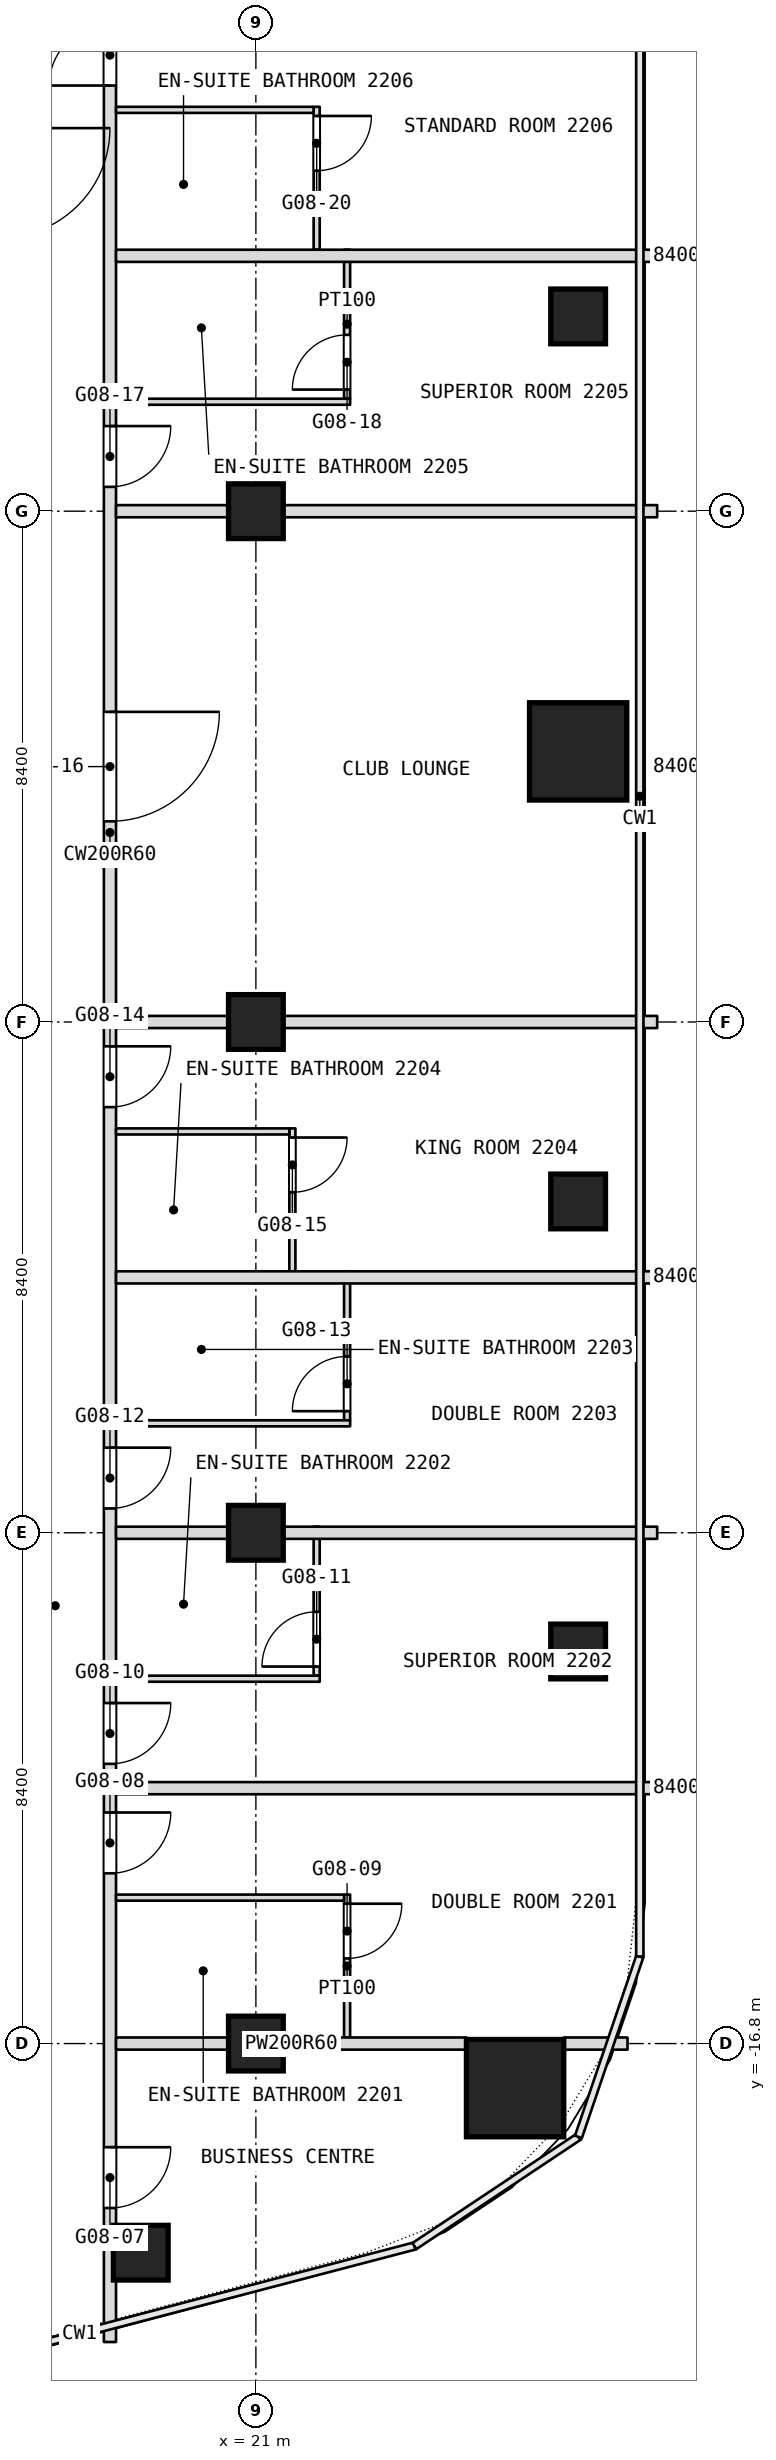
"""IFC4 building model, lengths in metres.
Left out: names, types, materials, properties, quantities, classifications, styles, units other than length and angle.
Written with IfcOpenShell. Run it as: python <this file> out.ifc"""

import sys

from ifc_helpers import new_model, si_unit, direction, frame, frame_2d, origin, origin_2d, place, context, subcontext, project, spatial, rectangle, extrude, element, fill, save


model = new_model("IFC4")
c1 = context("Model", 3, precision=1e-05, world=origin(), true_north=direction((0.0, 1.0)))
c2 = subcontext(c1, "Body", "Model", "MODEL_VIEW")
j1 = project(units=[si_unit("LENGTHUNIT", "METRE"), si_unit("PLANEANGLEUNIT", "RADIAN")], contexts=[c1])
p1 = place(None, origin())
s1 = spatial("IfcSite", under=j1, at=p1, CompositionType="ELEMENT")
p2 = place(p1, origin())
s2 = spatial("IfcBuilding", under=s1, at=p2, CompositionType="ELEMENT")
p3 = place(p2, frame((0.0, 0.0, 104.9)))
s3 = spatial("IfcBuildingStorey", under=s2, at=p3, CompositionType="ELEMENT", Elevation=104.9)
for number, where, z_axis, x_axis in (
    (1, (25.263, -17.533, 0.0), (0.0, 0.0, 1.0), (1.0, 0.0, 0.0)),
    (2, (26.3, 4.45, 0.0), (0.0, 0.0, 1.0), (1.0, 0.0, 0.0)),
):
    element("IfcColumn", number, at=place(p3, frame(where, z_axis=z_axis, x_axis=x_axis)), inside=s3, PredefinedType="COLUMN", context=c2, shape_type="SweptSolid", body=[
        extrude(rectangle(XDim=1.6, YDim=1.6, at=origin_2d()), origin(), (0.0, 0.0, 1.0), 3.6),
    ])
for number, where, z_axis, x_axis in (
    (3, (21.0, -16.8, 0.0), (0.0, 0.0, 1.0), (1.0, 0.0, 0.0)),
    (4, (21.0, -8.4, 0.0), (0.0, 0.0, 1.0), (1.0, 0.0, 0.0)),
    (5, (21.0, 0.0, 0.0), (0.0, 0.0, 1.0), (1.0, 0.0, 0.0)),
    (6, (21.0, 8.4, 0.0), (0.0, 0.0, 1.0), (1.0, 0.0, 0.0)),
    (7, (26.3, 11.603, 0.0), (0.0, 0.0, 1.0), (1.0, 0.0, 0.0)),
    (8, (26.3, -2.951, 0.0), (0.0, 0.0, 1.0), (1.0, 0.0, 0.0)),
    (9, (26.3, -10.352, 0.0), (0.0, 0.0, 1.0), (1.0, 0.0, 0.0)),
    (10, (19.107, -20.239, 0.0), (0.0, 0.0, 1.0), (1.0, 0.0, 0.0)),
):
    element("IfcColumn", number, at=place(p3, frame(where, z_axis=z_axis, x_axis=x_axis)), inside=s3, PredefinedType="COLUMN", context=c2, shape_type="SweptSolid", body=[
        extrude(rectangle(XDim=0.9, YDim=0.9, at=origin_2d()), origin(), (0.0, 0.0, 1.0), 3.6),
    ])
p4 = place(p3, frame((22.5, -16.7, 0.0), z_axis=(0.0, 0.0, 1.0), x_axis=(0.0, 1.0, 0.0)))
e11 = element("IfcWall", 11, at=p4, inside=s3, PredefinedType="PARTITIONING", context=c2, shape_type="SweptSolid", body=[
    extrude(rectangle(XDim=2.35, YDim=0.1, at=frame_2d((1.175, 0.0))), origin(), (0.0, 0.0, 1.0), 3.34),
])
p5 = place(p4, frame((1.3, 0.0, 0.0)))
e12 = element("IfcOpeningElement", 12, at=p5, cuts=e11, PredefinedType="OPENING", context=c2, shape_type="SweptSolid", body=[
    extrude(rectangle(XDim=0.9, YDim=2.1, at=frame_2d((0.45, 1.05))), frame((0.0, 0.05, 0.0), z_axis=(0.0, -1.0, 0.0), x_axis=(1.0, 0.0, 0.0)), (0.0, 0.0, 1.0), 0.1),
])
p6 = place(p3, frame((22.5, -6.55, 0.0), z_axis=(0.0, 0.0, 1.0), x_axis=(0.0, 1.0, 0.0)))
e13 = element("IfcWall", 13, at=p6, inside=s3, PredefinedType="PARTITIONING", context=c2, shape_type="SweptSolid", body=[
    extrude(rectangle(XDim=2.45, YDim=0.1, at=frame_2d((1.225, 0.0))), origin(), (0.0, 0.0, 1.0), 3.34),
])
p7 = place(p6, frame((0.15, 0.0, 0.0)))
e14 = element("IfcOpeningElement", 14, at=p7, cuts=e13, PredefinedType="OPENING", context=c2, shape_type="SweptSolid", body=[
    extrude(rectangle(XDim=0.9, YDim=2.1, at=frame_2d((0.45, 1.05))), frame((0.0, 0.05, 0.0), z_axis=(0.0, -1.0, 0.0), x_axis=(1.0, 0.0, 0.0)), (0.0, 0.0, 1.0), 0.1),
])
p8 = place(p3, frame((22.5, 10.25, 0.0), z_axis=(0.0, 0.0, 1.0), x_axis=(0.0, 1.0, 0.0)))
e15 = element("IfcWall", 15, at=p8, inside=s3, PredefinedType="PARTITIONING", context=c2, shape_type="SweptSolid", body=[
    extrude(rectangle(XDim=2.45, YDim=0.1, at=frame_2d((1.225, 0.0))), origin(), (0.0, 0.0, 1.0), 3.34),
])
p9 = place(p8, frame((0.15, 0.0, 0.0)))
e16 = element("IfcOpeningElement", 16, at=p9, cuts=e15, PredefinedType="OPENING", context=c2, shape_type="SweptSolid", body=[
    extrude(rectangle(XDim=0.9, YDim=2.1, at=frame_2d((0.45, 1.05))), frame((0.0, 0.05, 0.0), z_axis=(0.0, -1.0, 0.0), x_axis=(1.0, 0.0, 0.0)), (0.0, 0.0, 1.0), 0.1),
])
p10 = place(p3, frame((22.0, -10.75, 0.0), z_axis=(0.0, 0.0, 1.0), x_axis=(0.0, 1.0, 0.0)))
e17 = element("IfcWall", 17, at=p10, inside=s3, PredefinedType="PARTITIONING", context=c2, shape_type="SweptSolid", body=[
    extrude(rectangle(XDim=2.45, YDim=0.1, at=frame_2d((1.225, 0.0))), origin(), (0.0, 0.0, 1.0), 3.34),
])
p11 = place(p10, frame((0.15, 0.0, 0.0)))
e18 = element("IfcOpeningElement", 18, at=p11, cuts=e17, PredefinedType="OPENING", context=c2, shape_type="SweptSolid", body=[
    extrude(rectangle(XDim=0.9, YDim=2.1, at=frame_2d((0.45, 1.05))), frame((0.0, 0.05, 0.0), z_axis=(0.0, -1.0, 0.0), x_axis=(1.0, 0.0, 0.0)), (0.0, 0.0, 1.0), 0.1),
])
p12 = place(p3, frame((22.0, 12.7, 0.0), z_axis=(0.0, 0.0, 1.0), x_axis=(0.0, 1.0, 0.0)))
e19 = element("IfcWall", 19, at=p12, inside=s3, PredefinedType="PARTITIONING", context=c2, shape_type="SweptSolid", body=[
    extrude(rectangle(XDim=2.35, YDim=0.1, at=frame_2d((1.175, 0.0))), origin(), (0.0, 0.0, 1.0), 3.34),
])
p13 = place(p12, frame((1.3, 0.0, 0.0)))
e20 = element("IfcOpeningElement", 20, at=p13, cuts=e19, PredefinedType="OPENING", context=c2, shape_type="SweptSolid", body=[
    extrude(rectangle(XDim=0.9, YDim=2.1, at=frame_2d((0.45, 1.05))), frame((0.0, 0.05, 0.0), z_axis=(0.0, -1.0, 0.0), x_axis=(1.0, 0.0, 0.0)), (0.0, 0.0, 1.0), 0.1),
])
p14 = place(p3, frame((21.6, -4.1, 0.0), z_axis=(0.0, 0.0, 1.0), x_axis=(0.0, 1.0, 0.0)))
e21 = element("IfcWall", 21, at=p14, inside=s3, PredefinedType="PARTITIONING", context=c2, shape_type="SweptSolid", body=[
    extrude(rectangle(XDim=2.35, YDim=0.1, at=frame_2d((1.175, 0.0))), origin(), (0.0, 0.0, 1.0), 3.34),
])
p15 = place(p14, frame((1.3, 0.0, 0.0)))
e22 = element("IfcOpeningElement", 22, at=p15, cuts=e21, PredefinedType="OPENING", context=c2, shape_type="SweptSolid", body=[
    extrude(rectangle(XDim=0.9, YDim=2.1, at=frame_2d((0.45, 1.05))), frame((0.0, 0.05, 0.0), z_axis=(0.0, -1.0, 0.0), x_axis=(1.0, 0.0, 0.0)), (0.0, 0.0, 1.0), 0.1),
])
p16 = place(p3, frame((18.6, -21.708, 0.0), z_axis=(0.0, 0.0, 1.0), x_axis=(0.0, 1.0, 0.0)))
e23 = element("IfcWall", 23, at=p16, inside=s3, PredefinedType="PARTITIONING", context=c2, shape_type="SweptSolid", body=[
    extrude(rectangle(XDim=49.648, YDim=0.2, at=frame_2d((24.824, 0.0))), origin(), (0.0, 0.0, 1.0), 3.34),
])
p17 = place(p16, frame((2.204, 0.0, 0.0)))
e24 = element("IfcOpeningElement", 24, at=p17, cuts=e23, PredefinedType="OPENING", context=c2, shape_type="SweptSolid", body=[
    extrude(rectangle(XDim=1.0, YDim=2.1, at=frame_2d((0.5, 1.05))), frame((0.0, 0.1, 0.0), z_axis=(0.0, -1.0, 0.0), x_axis=(1.0, 0.0, 0.0)), (0.0, 0.0, 1.0), 0.2),
])
p18 = place(p16, frame((7.708, 0.0, 0.0)))
e25 = element("IfcOpeningElement", 25, at=p18, cuts=e23, PredefinedType="OPENING", context=c2, shape_type="SweptSolid", body=[
    extrude(rectangle(XDim=1.0, YDim=2.1, at=frame_2d((0.5, 1.05))), frame((0.0, 0.1, 0.0), z_axis=(0.0, -1.0, 0.0), x_axis=(1.0, 0.0, 0.0)), (0.0, 0.0, 1.0), 0.2),
])
p19 = place(p16, frame((9.508, 0.0, 0.0)))
e26 = element("IfcOpeningElement", 26, at=p19, cuts=e23, PredefinedType="OPENING", context=c2, shape_type="SweptSolid", body=[
    extrude(rectangle(XDim=1.0, YDim=2.1, at=frame_2d((0.5, 1.05))), frame((0.0, 0.1, 0.0), z_axis=(0.0, -1.0, 0.0), x_axis=(1.0, 0.0, 0.0)), (0.0, 0.0, 1.0), 0.2),
])
p20 = place(p16, frame((13.708, 0.0, 0.0)))
e27 = element("IfcOpeningElement", 27, at=p20, cuts=e23, PredefinedType="OPENING", context=c2, shape_type="SweptSolid", body=[
    extrude(rectangle(XDim=1.0, YDim=2.1, at=frame_2d((0.5, 1.05))), frame((0.0, 0.1, 0.0), z_axis=(0.0, -1.0, 0.0), x_axis=(1.0, 0.0, 0.0)), (0.0, 0.0, 1.0), 0.2),
])
p21 = place(p16, frame((20.308, 0.0, 0.0)))
e28 = element("IfcOpeningElement", 28, at=p21, cuts=e23, PredefinedType="OPENING", context=c2, shape_type="SweptSolid", body=[
    extrude(rectangle(XDim=1.0, YDim=2.1, at=frame_2d((0.5, 1.05))), frame((0.0, 0.1, 0.0), z_axis=(0.0, -1.0, 0.0), x_axis=(1.0, 0.0, 0.0)), (0.0, 0.0, 1.0), 0.2),
])
p22 = place(p16, frame((25.008, 0.0, 0.0)))
e29 = element("IfcOpeningElement", 29, at=p22, cuts=e23, PredefinedType="OPENING", context=c2, shape_type="SweptSolid", body=[
    extrude(rectangle(XDim=1.8, YDim=2.1, at=frame_2d((0.9, 1.05))), frame((0.0, 0.1, 0.0), z_axis=(0.0, -1.0, 0.0), x_axis=(1.0, 0.0, 0.0)), (0.0, 0.0, 1.0), 0.2),
])
p23 = place(p16, frame((30.508, 0.0, 0.0)))
e30 = element("IfcOpeningElement", 30, at=p23, cuts=e23, PredefinedType="OPENING", context=c2, shape_type="SweptSolid", body=[
    extrude(rectangle(XDim=1.0, YDim=2.1, at=frame_2d((0.5, 1.05))), frame((0.0, 0.1, 0.0), z_axis=(0.0, -1.0, 0.0), x_axis=(1.0, 0.0, 0.0)), (0.0, 0.0, 1.0), 0.2),
])
p24 = place(p16, frame((37.108, 0.0, 0.0)))
e31 = element("IfcOpeningElement", 31, at=p24, cuts=e23, PredefinedType="OPENING", context=c2, shape_type="SweptSolid", body=[
    extrude(rectangle(XDim=1.0, YDim=2.1, at=frame_2d((0.5, 1.05))), frame((0.0, 0.1, 0.0), z_axis=(0.0, -1.0, 0.0), x_axis=(1.0, 0.0, 0.0)), (0.0, 0.0, 1.0), 0.2),
])
p25 = place(p16, frame((42.608, 0.0, 0.0)))
e32 = element("IfcOpeningElement", 32, at=p25, cuts=e23, PredefinedType="OPENING", context=c2, shape_type="SweptSolid", body=[
    extrude(rectangle(XDim=1.0, YDim=2.1, at=frame_2d((0.5, 1.05))), frame((0.0, 0.1, 0.0), z_axis=(0.0, -1.0, 0.0), x_axis=(1.0, 0.0, 0.0)), (0.0, 0.0, 1.0), 0.2),
])
p26 = place(p16, frame((44.608, 0.0, 0.0)))
e33 = element("IfcOpeningElement", 33, at=p26, cuts=e23, PredefinedType="OPENING", context=c2, shape_type="SweptSolid", body=[
    extrude(rectangle(XDim=1.0, YDim=2.1, at=frame_2d((0.5, 1.05))), frame((0.0, 0.1, 0.0), z_axis=(0.0, -1.0, 0.0), x_axis=(1.0, 0.0, 0.0)), (0.0, 0.0, 1.0), 0.2),
])
p27 = place(p3, frame((18.7, -16.8, 0.0), z_axis=(0.0, 0.0, 1.0), x_axis=(1.0, 0.0, 0.0)))
e34 = element("IfcWall", 34, at=p27, inside=s3, PredefinedType="PARTITIONING", context=c2, shape_type="SweptSolid", body=[
    extrude(rectangle(XDim=5.763, YDim=0.2, at=frame_2d((2.881, 0.0))), origin(), (0.0, 0.0, 1.0), 2.89),
])
p28 = place(p3, frame((26.063, -16.8, 0.0), z_axis=(0.0, 0.0, 1.0), x_axis=(1.0, 0.0, 0.0)))
e35 = element("IfcWall", 35, at=p28, inside=s3, PredefinedType="PARTITIONING", context=c2, shape_type="SweptSolid", body=[
    extrude(rectangle(XDim=1.049, YDim=0.2, at=frame_2d((0.524, 0.0))), origin(), (0.0, 0.0, 1.0), 3.34),
])
p29 = place(p3, frame((18.7, -14.4, 0.0), z_axis=(0.0, 0.0, 1.0), x_axis=(1.0, 0.0, 0.0)))
e36 = element("IfcWall", 36, at=p29, inside=s3, PredefinedType="PARTITIONING", context=c2, shape_type="SweptSolid", body=[
    extrude(rectangle(XDim=3.75, YDim=0.1, at=frame_2d((1.875, 0.0))), origin(), (0.0, 0.0, 1.0), 3.34),
])
p30 = place(p3, frame((18.7, -12.6, 0.0), z_axis=(0.0, 0.0, 1.0), x_axis=(1.0, 0.0, 0.0)))
e37 = element("IfcWall", 37, at=p30, inside=s3, PredefinedType="PARTITIONING", context=c2, shape_type="SweptSolid", body=[
    extrude(rectangle(XDim=8.9, YDim=0.2, at=frame_2d((4.45, 0.0))), origin(), (0.0, 0.0, 1.0), 3.34),
])
p31 = place(p3, frame((18.7, -10.8, 0.0), z_axis=(0.0, 0.0, 1.0), x_axis=(1.0, 0.0, 0.0)))
e38 = element("IfcWall", 38, at=p31, inside=s3, PredefinedType="PARTITIONING", context=c2, shape_type="SweptSolid", body=[
    extrude(rectangle(XDim=3.35, YDim=0.1, at=frame_2d((1.675, 0.0))), origin(), (0.0, 0.0, 1.0), 3.34),
])
p32 = place(p3, frame((18.7, -8.4, 0.0), z_axis=(0.0, 0.0, 1.0), x_axis=(1.0, 0.0, 0.0)))
e39 = element("IfcWall", 39, at=p32, inside=s3, PredefinedType="PARTITIONING", context=c2, shape_type="SweptSolid", body=[
    extrude(rectangle(XDim=8.9, YDim=0.2, at=frame_2d((4.45, 0.0))), origin(), (0.0, 0.0, 1.0), 2.89),
])
p33 = place(p3, frame((18.7, -6.6, 0.0), z_axis=(0.0, 0.0, 1.0), x_axis=(1.0, 0.0, 0.0)))
e40 = element("IfcWall", 40, at=p33, inside=s3, PredefinedType="PARTITIONING", context=c2, shape_type="SweptSolid", body=[
    extrude(rectangle(XDim=3.85, YDim=0.1, at=frame_2d((1.925, 0.0))), origin(), (0.0, 0.0, 1.0), 3.34),
])
p34 = place(p3, frame((18.7, -4.2, 0.0), z_axis=(0.0, 0.0, 1.0), x_axis=(1.0, 0.0, 0.0)))
e41 = element("IfcWall", 41, at=p34, inside=s3, PredefinedType="PARTITIONING", context=c2, shape_type="SweptSolid", body=[
    extrude(rectangle(XDim=8.9, YDim=0.2, at=frame_2d((4.45, 0.0))), origin(), (0.0, 0.0, 1.0), 3.34),
])
p35 = place(p3, frame((18.7, -1.8, 0.0), z_axis=(0.0, 0.0, 1.0), x_axis=(1.0, 0.0, 0.0)))
e42 = element("IfcWall", 42, at=p35, inside=s3, PredefinedType="PARTITIONING", context=c2, shape_type="SweptSolid", body=[
    extrude(rectangle(XDim=2.85, YDim=0.1, at=frame_2d((1.425, 0.0))), origin(), (0.0, 0.0, 1.0), 3.34),
])
for number, where, z_axis, x_axis in (
    (43, (18.7, 0.0, 0.0), (0.0, 0.0, 1.0), (1.0, 0.0, 0.0)),
    (44, (18.7, 8.4, 0.0), (0.0, 0.0, 1.0), (1.0, 0.0, 0.0)),
):
    element("IfcWall", number, at=place(p3, frame(where, z_axis=z_axis, x_axis=x_axis)), inside=s3, PredefinedType="PARTITIONING", context=c2, shape_type="SweptSolid", body=[
        extrude(rectangle(XDim=8.9, YDim=0.2, at=frame_2d((4.45, 0.0))), origin(), (0.0, 0.0, 1.0), 2.89),
    ])
p36 = place(p3, frame((18.7, 10.2, 0.0), z_axis=(0.0, 0.0, 1.0), x_axis=(1.0, 0.0, 0.0)))
e45 = element("IfcWall", 45, at=p36, inside=s3, PredefinedType="PARTITIONING", context=c2, shape_type="SweptSolid", body=[
    extrude(rectangle(XDim=3.85, YDim=0.1, at=frame_2d((1.925, 0.0))), origin(), (0.0, 0.0, 1.0), 3.34),
])
p37 = place(p3, frame((18.7, 12.6, 0.0), z_axis=(0.0, 0.0, 1.0), x_axis=(1.0, 0.0, 0.0)))
e46 = element("IfcWall", 46, at=p37, inside=s3, PredefinedType="PARTITIONING", context=c2, shape_type="SweptSolid", body=[
    extrude(rectangle(XDim=8.9, YDim=0.2, at=frame_2d((4.45, 0.0))), origin(), (0.0, 0.0, 1.0), 3.34),
])
p38 = place(p3, frame((18.7, 15.0, 0.0), z_axis=(0.0, 0.0, 1.0), x_axis=(1.0, 0.0, 0.0)))
e47 = element("IfcWall", 47, at=p38, inside=s3, PredefinedType="PARTITIONING", context=c2, shape_type="SweptSolid", body=[
    extrude(rectangle(XDim=3.25, YDim=0.1, at=frame_2d((1.625, 0.0))), origin(), (0.0, 0.0, 1.0), 3.34),
])
p39 = place(p5, origin())
e48 = element("IfcDoor", 48, at=p39, inside=s3, OperationType="SINGLE_SWING_RIGHT", PredefinedType="DOOR", context=c2, shape_type="SweptSolid", body=[
    extrude(rectangle(XDim=0.9, YDim=2.1, at=frame_2d((0.45, 1.05))), frame((0.0, 0.025, 0.0), z_axis=(0.0, -1.0, 0.0), x_axis=(1.0, 0.0, 0.0)), (0.0, 0.0, 1.0), 0.05),
])
fill(e12, e48)
p40 = place(p7, origin())
e49 = element("IfcDoor", 49, at=p40, inside=s3, OperationType="SINGLE_SWING_LEFT", PredefinedType="DOOR", context=c2, shape_type="SweptSolid", body=[
    extrude(rectangle(XDim=0.9, YDim=2.1, at=frame_2d((0.45, 1.05))), frame((0.0, 0.025, 0.0), z_axis=(0.0, -1.0, 0.0), x_axis=(1.0, 0.0, 0.0)), (0.0, 0.0, 1.0), 0.05),
])
fill(e14, e49)
p41 = place(p9, origin())
e50 = element("IfcDoor", 50, at=p41, inside=s3, OperationType="SINGLE_SWING_LEFT", PredefinedType="DOOR", context=c2, shape_type="SweptSolid", body=[
    extrude(rectangle(XDim=0.9, YDim=2.1, at=frame_2d((0.45, 1.05))), frame((0.0, 0.025, 0.0), z_axis=(0.0, -1.0, 0.0), x_axis=(1.0, 0.0, 0.0)), (0.0, 0.0, 1.0), 0.05),
])
fill(e16, e50)
p42 = place(p11, origin())
e51 = element("IfcDoor", 51, at=p42, inside=s3, OperationType="SINGLE_SWING_LEFT", PredefinedType="DOOR", context=c2, shape_type="SweptSolid", body=[
    extrude(rectangle(XDim=0.9, YDim=2.1, at=frame_2d((0.45, 1.05))), frame((0.0, 0.025, 0.0), z_axis=(0.0, -1.0, 0.0), x_axis=(1.0, 0.0, 0.0)), (0.0, 0.0, 1.0), 0.05),
])
fill(e18, e51)
p43 = place(p13, origin())
e52 = element("IfcDoor", 52, at=p43, inside=s3, OperationType="SINGLE_SWING_RIGHT", PredefinedType="DOOR", context=c2, shape_type="SweptSolid", body=[
    extrude(rectangle(XDim=0.9, YDim=2.1, at=frame_2d((0.45, 1.05))), frame((0.0, 0.025, 0.0), z_axis=(0.0, -1.0, 0.0), x_axis=(1.0, 0.0, 0.0)), (0.0, 0.0, 1.0), 0.05),
])
fill(e20, e52)
p44 = place(p15, origin())
e53 = element("IfcDoor", 53, at=p44, inside=s3, OperationType="SINGLE_SWING_RIGHT", PredefinedType="DOOR", context=c2, shape_type="SweptSolid", body=[
    extrude(rectangle(XDim=0.9, YDim=2.1, at=frame_2d((0.45, 1.05))), frame((0.0, 0.025, 0.0), z_axis=(0.0, -1.0, 0.0), x_axis=(1.0, 0.0, 0.0)), (0.0, 0.0, 1.0), 0.05),
])
fill(e22, e53)
p45 = place(p17, origin())
e54 = element("IfcDoor", 54, at=p45, inside=s3, OperationType="SINGLE_SWING_LEFT", PredefinedType="DOOR", context=c2, shape_type="SweptSolid", body=[
    extrude(rectangle(XDim=1.0, YDim=2.1, at=frame_2d((0.5, 1.05))), frame((0.0, 0.025, 0.0), z_axis=(0.0, -1.0, 0.0), x_axis=(1.0, 0.0, 0.0)), (0.0, 0.0, 1.0), 0.05),
])
fill(e24, e54)
p46 = place(p18, origin())
e55 = element("IfcDoor", 55, at=p46, inside=s3, OperationType="SINGLE_SWING_RIGHT", PredefinedType="DOOR", context=c2, shape_type="SweptSolid", body=[
    extrude(rectangle(XDim=1.0, YDim=2.1, at=frame_2d((0.5, 1.05))), frame((0.0, 0.025, 0.0), z_axis=(0.0, -1.0, 0.0), x_axis=(1.0, 0.0, 0.0)), (0.0, 0.0, 1.0), 0.05),
])
fill(e25, e55)
p47 = place(p19, origin())
e56 = element("IfcDoor", 56, at=p47, inside=s3, OperationType="SINGLE_SWING_RIGHT", PredefinedType="DOOR", context=c2, shape_type="SweptSolid", body=[
    extrude(rectangle(XDim=1.0, YDim=2.1, at=frame_2d((0.5, 1.05))), frame((0.0, 0.025, 0.0), z_axis=(0.0, -1.0, 0.0), x_axis=(1.0, 0.0, 0.0)), (0.0, 0.0, 1.0), 0.05),
])
fill(e26, e56)
p48 = place(p20, origin())
e57 = element("IfcDoor", 57, at=p48, inside=s3, OperationType="SINGLE_SWING_RIGHT", PredefinedType="DOOR", context=c2, shape_type="SweptSolid", body=[
    extrude(rectangle(XDim=1.0, YDim=2.1, at=frame_2d((0.5, 1.05))), frame((0.0, 0.025, 0.0), z_axis=(0.0, -1.0, 0.0), x_axis=(1.0, 0.0, 0.0)), (0.0, 0.0, 1.0), 0.05),
])
fill(e27, e57)
p49 = place(p21, origin())
e58 = element("IfcDoor", 58, at=p49, inside=s3, OperationType="SINGLE_SWING_RIGHT", PredefinedType="DOOR", context=c2, shape_type="SweptSolid", body=[
    extrude(rectangle(XDim=1.0, YDim=2.1, at=frame_2d((0.5, 1.05))), frame((0.0, 0.025, 0.0), z_axis=(0.0, -1.0, 0.0), x_axis=(1.0, 0.0, 0.0)), (0.0, 0.0, 1.0), 0.05),
])
fill(e28, e58)
p50 = place(p22, origin())
e59 = element("IfcDoor", 59, at=p50, inside=s3, OperationType="DOUBLE_DOOR_SINGLE_SWING", PredefinedType="DOOR", context=c2, shape_type="SweptSolid", body=[
    extrude(rectangle(XDim=1.8, YDim=2.1, at=frame_2d((0.9, 1.05))), frame((0.0, 0.025, 0.0), z_axis=(0.0, -1.0, 0.0), x_axis=(1.0, 0.0, 0.0)), (0.0, 0.0, 1.0), 0.05),
])
fill(e29, e59)
p51 = place(p23, origin())
e60 = element("IfcDoor", 60, at=p51, inside=s3, OperationType="SINGLE_SWING_LEFT", PredefinedType="DOOR", context=c2, shape_type="SweptSolid", body=[
    extrude(rectangle(XDim=1.0, YDim=2.1, at=frame_2d((0.5, 1.05))), frame((0.0, 0.025, 0.0), z_axis=(0.0, -1.0, 0.0), x_axis=(1.0, 0.0, 0.0)), (0.0, 0.0, 1.0), 0.05),
])
fill(e30, e60)
p52 = place(p24, origin())
e61 = element("IfcDoor", 61, at=p52, inside=s3, OperationType="SINGLE_SWING_LEFT", PredefinedType="DOOR", context=c2, shape_type="SweptSolid", body=[
    extrude(rectangle(XDim=1.0, YDim=2.1, at=frame_2d((0.5, 1.05))), frame((0.0, 0.025, 0.0), z_axis=(0.0, -1.0, 0.0), x_axis=(1.0, 0.0, 0.0)), (0.0, 0.0, 1.0), 0.05),
])
fill(e31, e61)
save(model, sys.argv[1])
